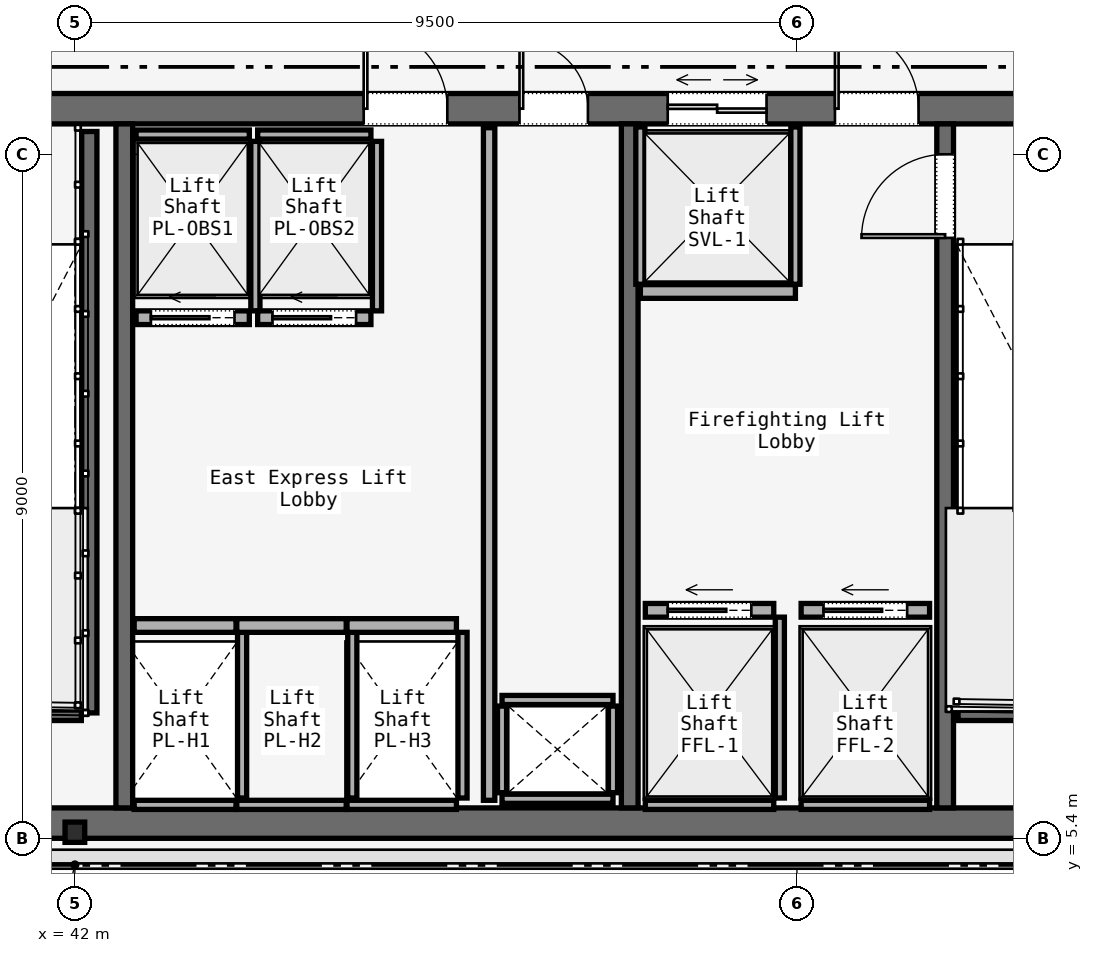
"""IFC4 building model, lengths in metres.
Left out: names, types, materials, properties, quantities, classifications, styles, units other than length and angle.
Written with IfcOpenShell. Run it as: python <this file> out.ifc"""

import sys

from ifc_helpers import new_model, si_unit, direction, frame, frame_2d, origin, origin_2d, place, context, subcontext, project, spatial, rectangle, i_section, extrude, element, fill, save


model = new_model("IFC4")
c1 = context("Model", 3, precision=1e-05, world=origin(), true_north=direction((0.0, 1.0)))
c2 = subcontext(c1, "Body", "Model", "MODEL_VIEW")
j1 = project(units=[si_unit("LENGTHUNIT", "METRE"), si_unit("PLANEANGLEUNIT", "RADIAN")], contexts=[c1])
p1 = place(None, origin())
s1 = spatial("IfcSite", under=j1, at=p1, CompositionType="ELEMENT")
p2 = place(p1, origin())
s2 = spatial("IfcBuilding", under=s1, at=p2, CompositionType="ELEMENT")
p3 = place(p2, frame((0.0, 0.0, 298.5)))
s3 = spatial("IfcBuildingStorey", under=s2, at=p3, CompositionType="ELEMENT", Elevation=298.5)
p4 = place(p3, frame((26.45, 15.0, 0.0), z_axis=(0.0, 0.0, 1.0), x_axis=(1.0, 0.0, 0.0)))
e1 = element("IfcWall", 1, at=p4, inside=s3, PredefinedType="SOLIDWALL", context=c2, shape_type="SweptSolid", body=[
    extrude(rectangle(XDim=31.1, YDim=0.4, at=frame_2d((15.55, 0.0))), origin(), (0.0, 0.0, 1.0), 4.52),
])
p5 = place(p4, frame((1.65, 0.0, 0.0)))
e2 = element("IfcOpeningElement", 2, at=p5, cuts=e1, PredefinedType="OPENING", context=c2, shape_type="SweptSolid", body=[
    extrude(rectangle(XDim=1.1, YDim=2.2, at=frame_2d((0.55, 1.1))), frame((0.0, 0.2, 0.0), z_axis=(0.0, -1.0, 0.0), x_axis=(1.0, 0.0, 0.0)), (0.0, 0.0, 1.0), 0.4),
])
p6 = place(p4, frame((13.65, 0.0, 0.0)))
e3 = element("IfcOpeningElement", 3, at=p6, cuts=e1, PredefinedType="OPENING", context=c2, shape_type="SweptSolid", body=[
    extrude(rectangle(XDim=1.1, YDim=2.2, at=frame_2d((0.55, 1.1))), frame((0.0, 0.2, 0.0), z_axis=(0.0, -1.0, 0.0), x_axis=(1.0, 0.0, 0.0)), (0.0, 0.0, 1.0), 0.4),
])
p7 = place(p4, frame((25.55, 0.0, 0.0)))
e4 = element("IfcOpeningElement", 4, at=p7, cuts=e1, PredefinedType="OPENING", context=c2, shape_type="SweptSolid", body=[
    extrude(rectangle(XDim=1.1, YDim=2.2, at=frame_2d((0.55, 1.1))), frame((0.0, 0.2, 0.0), z_axis=(0.0, -1.0, 0.0), x_axis=(1.0, 0.0, 0.0)), (0.0, 0.0, 1.0), 0.4),
])
p8 = place(p4, frame((19.35, 0.0, 0.0)))
e5 = element("IfcOpeningElement", 5, at=p8, cuts=e1, PredefinedType="OPENING", context=c2, shape_type="SweptSolid", body=[
    extrude(rectangle(XDim=1.1, YDim=2.2, at=frame_2d((0.55, 1.1))), frame((0.0, 0.2, 0.0), z_axis=(0.0, -1.0, 0.0), x_axis=(1.0, 0.0, 0.0)), (0.0, 0.0, 1.0), 0.4),
])
p9 = place(p4, frame((21.4, 0.0, 0.0)))
e6 = element("IfcOpeningElement", 6, at=p9, cuts=e1, PredefinedType="OPENING", context=c2, shape_type="SweptSolid", body=[
    extrude(rectangle(XDim=0.9, YDim=2.1, at=frame_2d((0.45, 1.05))), frame((0.0, 0.2, 0.0), z_axis=(0.0, -1.0, 0.0), x_axis=(1.0, 0.0, 0.0)), (0.0, 0.0, 1.0), 0.4),
])
p10 = place(p4, frame((6.54, 0.0, 0.0)))
e7 = element("IfcOpeningElement", 7, at=p10, cuts=e1, PredefinedType="OPENING", context=c2, shape_type="SweptSolid", body=[
    extrude(rectangle(XDim=0.95, YDim=2.2, at=frame_2d((0.475, 1.1))), frame((0.0, 0.2, 0.0), z_axis=(0.0, -1.0, 0.0), x_axis=(1.0, 0.0, 0.0)), (0.0, 0.0, 1.0), 0.4),
])
p11 = place(p4, frame((10.49, 0.0, 0.0)))
e8 = element("IfcOpeningElement", 8, at=p11, cuts=e1, PredefinedType="OPENING", context=c2, shape_type="SweptSolid", body=[
    extrude(rectangle(XDim=0.95, YDim=2.2, at=frame_2d((0.475, 1.1))), frame((0.0, 0.2, 0.0), z_axis=(0.0, -1.0, 0.0), x_axis=(1.0, 0.0, 0.0)), (0.0, 0.0, 1.0), 0.4),
])
p12 = place(p4, frame((23.35, 0.0, 0.0)))
e9 = element("IfcOpeningElement", 9, at=p12, cuts=e1, PredefinedType="OPENING", context=c2, shape_type="SweptSolid", body=[
    extrude(rectangle(XDim=1.3, YDim=2.3, at=frame_2d((0.65, 1.15))), frame((0.0, 0.2, 0.0), z_axis=(0.0, -1.0, 0.0), x_axis=(1.0, 0.0, 0.0)), (0.0, 0.0, 1.0), 0.4),
])
p13 = place(p3, frame((26.45, 5.6, 0.0), z_axis=(0.0, 0.0, 1.0), x_axis=(1.0, 0.0, 0.0)))
e10 = element("IfcWall", 10, at=p13, inside=s3, PredefinedType="SOLIDWALL", context=c2, shape_type="SweptSolid", body=[
    extrude(rectangle(XDim=31.1, YDim=0.4, at=frame_2d((15.55, 0.0))), origin(), (0.0, 0.0, 1.0), 4.52),
])
for number, where, z_axis, x_axis in (
    (11, (42.65, 5.8, 0.0), (0.0, 0.0, 1.0), (0.0, 1.0, 0.0)),
    (12, (49.3, 5.8, 0.0), (0.0, 0.0, 1.0), (0.0, 1.0, 0.0)),
):
    element("IfcWall", number, at=place(p3, frame(where, z_axis=z_axis, x_axis=x_axis)), inside=s3, PredefinedType="SOLIDWALL", context=c2, shape_type="SweptSolid", body=[
        extrude(rectangle(XDim=9.0, YDim=0.22, at=frame_2d((4.5, 0.0))), origin(), (0.0, 0.0, 1.0), 4.52),
    ])
p14 = place(p3, frame((53.45, 5.8, 0.0), z_axis=(0.0, 0.0, 1.0), x_axis=(0.0, 1.0, 0.0)))
e13 = element("IfcWall", 13, at=p14, inside=s3, PredefinedType="SOLIDWALL", context=c2, shape_type="SweptSolid", body=[
    extrude(rectangle(XDim=9.0, YDim=0.22, at=frame_2d((4.5, 0.0))), origin(), (0.0, 0.0, 1.0), 4.52),
])
p15 = place(p14, frame((7.5, 0.0, 0.0)))
e14 = element("IfcOpeningElement", 14, at=p15, cuts=e13, PredefinedType="OPENING", context=c2, shape_type="SweptSolid", body=[
    extrude(rectangle(XDim=1.1, YDim=2.2, at=frame_2d((0.55, 1.1))), frame((0.0, 0.11, 0.0), z_axis=(0.0, -1.0, 0.0), x_axis=(1.0, 0.0, 0.0)), (0.0, 0.0, 1.0), 0.22),
])
p16 = place(p3, frame((42.0, 5.48, 0.0), z_axis=(0.0, 0.0, 1.0), x_axis=(1.0, 0.0, 0.0)))
e15 = element("IfcColumn", 15, at=p16, inside=s3, PredefinedType="COLUMN", context=c2, shape_type="SweptSolid", body=[
    extrude(i_section(OverallWidth=0.259, OverallDepth=0.267, WebThickness=0.013, FlangeThickness=0.021, FilletRadius=0.013, at=origin_2d()), origin(), (0.0, 0.0, 1.0), 4.52),
])
p17 = place(p3, frame((42.19, 14.7, 0.0), z_axis=(0.0, 0.0, 1.0), x_axis=(0.0, -1.0, 0.0)))
e16 = element("IfcWall", 16, at=p17, inside=s3, PredefinedType="SOLIDWALL", context=c2, shape_type="SweptSolid", body=[
    extrude(rectangle(XDim=7.65, YDim=0.2, at=frame_2d((3.825, 0.0))), origin(), (0.0, 0.0, 1.0), 4.8),
])
for number, where, z_axis, x_axis in (
    (17, (38.97, 7.05, 0.0), (0.0, 0.0, 1.0), (1.0, 0.0, 0.0)),
    (18, (53.62, 7.05, 0.0), (0.0, 0.0, 1.0), (1.0, 0.0, 0.0)),
):
    element("IfcWall", number, at=place(p3, frame(where, z_axis=z_axis, x_axis=x_axis)), inside=s3, PredefinedType="SOLIDWALL", context=c2, shape_type="SweptSolid", body=[
        extrude(rectangle(XDim=3.115, YDim=0.2, at=frame_2d((1.558, 0.0))), origin(), (0.0, 0.0, 1.0), 4.8),
    ])
for number, where, z_axis, x_axis in (
    (19, (47.62, 5.92, 0.0), (0.0, 0.0, 1.0), (1.0, 0.0, 0.0)),
    (20, (47.62, 7.22, 0.0), (0.0, 0.0, 1.0), (1.0, 0.0, 0.0)),
):
    element("IfcWall", number, at=place(p3, frame(where, z_axis=z_axis, x_axis=x_axis)), inside=s3, PredefinedType="SOLIDWALL", context=c2, shape_type="SweptSolid", body=[
        extrude(rectangle(XDim=1.46, YDim=0.12, at=frame_2d((0.73, 0.0))), origin(), (0.0, 0.0, 1.0), 3.95),
    ])
for number, where, z_axis, x_axis in (
    (21, (47.62, 6.0, 0.0), (0.0, 0.0, 1.0), (0.0, 1.0, 0.0)),
    (22, (49.08, 6.0, 0.0), (0.0, 0.0, 1.0), (0.0, 1.0, 0.0)),
):
    element("IfcWall", number, at=place(p3, frame(where, z_axis=z_axis, x_axis=x_axis)), inside=s3, PredefinedType="SOLIDWALL", context=c2, shape_type="SweptSolid", body=[
        extrude(rectangle(XDim=1.14, YDim=0.12, at=frame_2d((0.57, 0.0))), origin(), (0.0, 0.0, 1.0), 3.95),
    ])
p18 = place(p3, frame((47.45, 5.9, 0.0), z_axis=(0.0, 0.0, 1.0), x_axis=(0.0, 1.0, 0.0)))
e23 = element("IfcWall", 23, at=p18, inside=s3, PredefinedType="PARTITIONING", context=c2, shape_type="SweptSolid", body=[
    extrude(rectangle(XDim=8.85, YDim=0.15, at=frame_2d((4.425, 0.0))), origin(), (0.0, 0.0, 1.0), 3.95),
])
p19 = place(p3, frame((42.78, 8.2, 0.0), z_axis=(0.0, 0.0, 1.0), x_axis=(1.0, 0.0, 0.0)))
e24 = element("IfcWall", 24, at=p19, inside=s3, PredefinedType="SOLIDWALL", context=c2, shape_type="SweptSolid", body=[
    extrude(rectangle(XDim=1.34, YDim=0.18, at=frame_2d((0.67, 0.0))), origin(), (0.0, 0.0, 1.0), 3.95),
])
p20 = place(p3, frame((42.78, 5.84, 0.0), z_axis=(0.0, 0.0, 1.0), x_axis=(1.0, 0.0, 0.0)))
e25 = element("IfcWall", 25, at=p20, inside=s3, PredefinedType="SOLIDWALL", context=c2, shape_type="SweptSolid", body=[
    extrude(rectangle(XDim=1.34, YDim=0.12, at=frame_2d((0.67, 0.0))), origin(), (0.0, 0.0, 1.0), 3.95),
])
p21 = place(p3, frame((44.2, 5.93, 0.0), z_axis=(0.0, 0.0, 1.0), x_axis=(0.0, 1.0, 0.0)))
e26 = element("IfcWall", 26, at=p21, inside=s3, PredefinedType="SOLIDWALL", context=c2, shape_type="SweptSolid", body=[
    extrude(rectangle(XDim=2.18, YDim=0.12, at=frame_2d((1.09, 0.0))), origin(), (0.0, 0.0, 1.0), 3.95),
])
p22 = place(p3, frame((44.13, 8.2, 0.0), z_axis=(0.0, 0.0, 1.0), x_axis=(1.0, 0.0, 0.0)))
e27 = element("IfcWall", 27, at=p22, inside=s3, PredefinedType="SOLIDWALL", context=c2, shape_type="SweptSolid", body=[
    extrude(rectangle(XDim=1.44, YDim=0.18, at=frame_2d((0.72, 0.0))), origin(), (0.0, 0.0, 1.0), 3.95),
])
p23 = place(p3, frame((44.13, 5.84, 0.0), z_axis=(0.0, 0.0, 1.0), x_axis=(1.0, 0.0, 0.0)))
e28 = element("IfcWall", 28, at=p23, inside=s3, PredefinedType="SOLIDWALL", context=c2, shape_type="SweptSolid", body=[
    extrude(rectangle(XDim=1.44, YDim=0.12, at=frame_2d((0.72, 0.0))), origin(), (0.0, 0.0, 1.0), 3.95),
])
p24 = place(p3, frame((45.65, 5.93, 0.0), z_axis=(0.0, 0.0, 1.0), x_axis=(0.0, 1.0, 0.0)))
e29 = element("IfcWall", 29, at=p24, inside=s3, PredefinedType="SOLIDWALL", context=c2, shape_type="SweptSolid", body=[
    extrude(rectangle(XDim=2.18, YDim=0.12, at=frame_2d((1.09, 0.0))), origin(), (0.0, 0.0, 1.0), 3.95),
])
p25 = place(p3, frame((45.58, 8.2, 0.0), z_axis=(0.0, 0.0, 1.0), x_axis=(1.0, 0.0, 0.0)))
e30 = element("IfcWall", 30, at=p25, inside=s3, PredefinedType="SOLIDWALL", context=c2, shape_type="SweptSolid", body=[
    extrude(rectangle(XDim=1.44, YDim=0.18, at=frame_2d((0.72, 0.0))), origin(), (0.0, 0.0, 1.0), 3.95),
])
p26 = place(p3, frame((45.58, 5.84, 0.0), z_axis=(0.0, 0.0, 1.0), x_axis=(1.0, 0.0, 0.0)))
e31 = element("IfcWall", 31, at=p26, inside=s3, PredefinedType="SOLIDWALL", context=c2, shape_type="SweptSolid", body=[
    extrude(rectangle(XDim=1.44, YDim=0.12, at=frame_2d((0.72, 0.0))), origin(), (0.0, 0.0, 1.0), 3.95),
])
p27 = place(p3, frame((47.1, 5.93, 0.0), z_axis=(0.0, 0.0, 1.0), x_axis=(0.0, 1.0, 0.0)))
e32 = element("IfcWall", 32, at=p27, inside=s3, PredefinedType="SOLIDWALL", context=c2, shape_type="SweptSolid", body=[
    extrude(rectangle(XDim=2.18, YDim=0.12, at=frame_2d((1.09, 0.0))), origin(), (0.0, 0.0, 1.0), 3.95),
])
p28 = place(p3, frame((42.805, 12.25, 0.0), z_axis=(0.0, 0.0, 1.0), x_axis=(1.0, 0.0, 0.0)))
e33 = element("IfcWall", 33, at=p28, inside=s3, PredefinedType="SOLIDWALL", context=c2, shape_type="SweptSolid", body=[
    extrude(rectangle(XDim=1.49, YDim=0.18, at=frame_2d((0.745, 0.0))), origin(), (0.0, 0.0, 1.0), 3.95),
])
p29 = place(p28, frame((0.195, 0.0, 0.0)))
e34 = element("IfcOpeningElement", 34, at=p29, cuts=e33, PredefinedType="OPENING", context=c2, shape_type="SweptSolid", body=[
    extrude(rectangle(XDim=1.1, YDim=2.2, at=frame_2d((0.55, 1.1))), frame((0.0, 0.09, 0.0), z_axis=(0.0, -1.0, 0.0), x_axis=(1.0, 0.0, 0.0)), (0.0, 0.0, 1.0), 0.18),
])
p30 = place(p3, frame((42.805, 14.66, 0.0), z_axis=(0.0, 0.0, 1.0), x_axis=(1.0, 0.0, 0.0)))
e35 = element("IfcWall", 35, at=p30, inside=s3, PredefinedType="SOLIDWALL", context=c2, shape_type="SweptSolid", body=[
    extrude(rectangle(XDim=1.49, YDim=0.12, at=frame_2d((0.745, 0.0))), origin(), (0.0, 0.0, 1.0), 3.95),
])
p31 = place(p3, frame((44.375, 12.34, 0.0), z_axis=(0.0, 0.0, 1.0), x_axis=(0.0, 1.0, 0.0)))
e36 = element("IfcWall", 36, at=p31, inside=s3, PredefinedType="SOLIDWALL", context=c2, shape_type="SweptSolid", body=[
    extrude(rectangle(XDim=2.23, YDim=0.12, at=frame_2d((1.115, 0.0))), origin(), (0.0, 0.0, 1.0), 3.95),
])
p32 = place(p3, frame((44.405, 12.25, 0.0), z_axis=(0.0, 0.0, 1.0), x_axis=(1.0, 0.0, 0.0)))
e37 = element("IfcWall", 37, at=p32, inside=s3, PredefinedType="SOLIDWALL", context=c2, shape_type="SweptSolid", body=[
    extrude(rectangle(XDim=1.49, YDim=0.18, at=frame_2d((0.745, 0.0))), origin(), (0.0, 0.0, 1.0), 3.95),
])
p33 = place(p32, frame((0.195, 0.0, 0.0)))
e38 = element("IfcOpeningElement", 38, at=p33, cuts=e37, PredefinedType="OPENING", context=c2, shape_type="SweptSolid", body=[
    extrude(rectangle(XDim=1.1, YDim=2.2, at=frame_2d((0.55, 1.1))), frame((0.0, 0.09, 0.0), z_axis=(0.0, -1.0, 0.0), x_axis=(1.0, 0.0, 0.0)), (0.0, 0.0, 1.0), 0.18),
])
p34 = place(p3, frame((44.405, 14.66, 0.0), z_axis=(0.0, 0.0, 1.0), x_axis=(1.0, 0.0, 0.0)))
e39 = element("IfcWall", 39, at=p34, inside=s3, PredefinedType="SOLIDWALL", context=c2, shape_type="SweptSolid", body=[
    extrude(rectangle(XDim=1.49, YDim=0.12, at=frame_2d((0.745, 0.0))), origin(), (0.0, 0.0, 1.0), 3.95),
])
p35 = place(p3, frame((45.975, 12.34, 0.0), z_axis=(0.0, 0.0, 1.0), x_axis=(0.0, 1.0, 0.0)))
e40 = element("IfcWall", 40, at=p35, inside=s3, PredefinedType="SOLIDWALL", context=c2, shape_type="SweptSolid", body=[
    extrude(rectangle(XDim=2.23, YDim=0.12, at=frame_2d((1.115, 0.0))), origin(), (0.0, 0.0, 1.0), 3.95),
])
p36 = place(p3, frame((49.505, 8.4, 0.0), z_axis=(0.0, 0.0, 1.0), x_axis=(1.0, 0.0, 0.0)))
e41 = element("IfcWall", 41, at=p36, inside=s3, PredefinedType="SOLIDWALL", context=c2, shape_type="SweptSolid", body=[
    extrude(rectangle(XDim=1.69, YDim=0.18, at=frame_2d((0.845, 0.0))), origin(), (0.0, 0.0, 1.0), 3.95),
])
p37 = place(p36, frame((0.295, 0.0, 0.0)))
e42 = element("IfcOpeningElement", 42, at=p37, cuts=e41, PredefinedType="OPENING", context=c2, shape_type="SweptSolid", body=[
    extrude(rectangle(XDim=1.1, YDim=2.2, at=frame_2d((0.55, 1.1))), frame((0.0, 0.09, 0.0), z_axis=(0.0, -1.0, 0.0), x_axis=(1.0, 0.0, 0.0)), (0.0, 0.0, 1.0), 0.18),
])
p38 = place(p3, frame((49.505, 5.84, 0.0), z_axis=(0.0, 0.0, 1.0), x_axis=(1.0, 0.0, 0.0)))
e43 = element("IfcWall", 43, at=p38, inside=s3, PredefinedType="SOLIDWALL", context=c2, shape_type="SweptSolid", body=[
    extrude(rectangle(XDim=1.69, YDim=0.12, at=frame_2d((0.845, 0.0))), origin(), (0.0, 0.0, 1.0), 3.95),
])
p39 = place(p3, frame((51.275, 5.93, 0.0), z_axis=(0.0, 0.0, 1.0), x_axis=(0.0, 1.0, 0.0)))
e44 = element("IfcWall", 44, at=p39, inside=s3, PredefinedType="SOLIDWALL", context=c2, shape_type="SweptSolid", body=[
    extrude(rectangle(XDim=2.38, YDim=0.12, at=frame_2d((1.19, 0.0))), origin(), (0.0, 0.0, 1.0), 3.95),
])
p40 = place(p3, frame((51.555, 8.4, 0.0), z_axis=(0.0, 0.0, 1.0), x_axis=(1.0, 0.0, 0.0)))
e45 = element("IfcWall", 45, at=p40, inside=s3, PredefinedType="SOLIDWALL", context=c2, shape_type="SweptSolid", body=[
    extrude(rectangle(XDim=1.69, YDim=0.18, at=frame_2d((0.845, 0.0))), origin(), (0.0, 0.0, 1.0), 3.95),
])
p41 = place(p40, frame((0.295, 0.0, 0.0)))
e46 = element("IfcOpeningElement", 46, at=p41, cuts=e45, PredefinedType="OPENING", context=c2, shape_type="SweptSolid", body=[
    extrude(rectangle(XDim=1.1, YDim=2.2, at=frame_2d((0.55, 1.1))), frame((0.0, 0.09, 0.0), z_axis=(0.0, -1.0, 0.0), x_axis=(1.0, 0.0, 0.0)), (0.0, 0.0, 1.0), 0.18),
])
p42 = place(p3, frame((51.555, 5.84, 0.0), z_axis=(0.0, 0.0, 1.0), x_axis=(1.0, 0.0, 0.0)))
e47 = element("IfcWall", 47, at=p42, inside=s3, PredefinedType="SOLIDWALL", context=c2, shape_type="SweptSolid", body=[
    extrude(rectangle(XDim=1.69, YDim=0.12, at=frame_2d((0.845, 0.0))), origin(), (0.0, 0.0, 1.0), 3.95),
])
p43 = place(p3, frame((49.44, 12.595, 0.0), z_axis=(0.0, 0.0, 1.0), x_axis=(1.0, 0.0, 0.0)))
e48 = element("IfcWall", 48, at=p43, inside=s3, PredefinedType="SOLIDWALL", context=c2, shape_type="SweptSolid", body=[
    extrude(rectangle(XDim=2.04, YDim=0.18, at=frame_2d((1.02, 0.0))), origin(), (0.0, 0.0, 1.0), 3.95),
])
for number, where, z_axis, x_axis in (
    (49, (49.44, 12.69, 0.0), (0.0, 0.0, 1.0), (0.0, 1.0, 0.0)),
    (50, (51.48, 12.69, 0.0), (0.0, 0.0, 1.0), (0.0, 1.0, 0.0)),
):
    element("IfcWall", number, at=place(p3, frame(where, z_axis=z_axis, x_axis=x_axis)), inside=s3, PredefinedType="SOLIDWALL", context=c2, shape_type="SweptSolid", body=[
        extrude(rectangle(XDim=2.07, YDim=0.12, at=frame_2d((1.035, 0.0))), origin(), (0.0, 0.0, 1.0), 3.95),
    ])
p44 = place(p7, origin())
e51 = element("IfcDoor", 51, at=p44, inside=s3, OperationType="SINGLE_SWING_RIGHT", PredefinedType="DOOR", context=c2, shape_type="SweptSolid", body=[
    extrude(rectangle(XDim=1.1, YDim=2.2, at=frame_2d((0.55, 1.1))), frame((0.0, 0.025, 0.0), z_axis=(0.0, -1.0, 0.0), x_axis=(1.0, 0.0, 0.0)), (0.0, 0.0, 1.0), 0.05),
])
fill(e4, e51)
p45 = place(p8, origin())
e52 = element("IfcDoor", 52, at=p45, inside=s3, OperationType="SINGLE_SWING_LEFT", PredefinedType="DOOR", context=c2, shape_type="SweptSolid", body=[
    extrude(rectangle(XDim=1.1, YDim=2.2, at=frame_2d((0.55, 1.1))), frame((0.0, 0.025, 0.0), z_axis=(0.0, -1.0, 0.0), x_axis=(1.0, 0.0, 0.0)), (0.0, 0.0, 1.0), 0.05),
])
fill(e5, e52)
p46 = place(p9, origin())
e53 = element("IfcDoor", 53, at=p46, inside=s3, OperationType="SINGLE_SWING_LEFT", PredefinedType="DOOR", context=c2, shape_type="SweptSolid", body=[
    extrude(rectangle(XDim=0.9, YDim=2.1, at=frame_2d((0.45, 1.05))), frame((0.0, 0.025, 0.0), z_axis=(0.0, -1.0, 0.0), x_axis=(1.0, 0.0, 0.0)), (0.0, 0.0, 1.0), 0.05),
])
fill(e6, e53)
p47 = place(p15, origin())
e54 = element("IfcDoor", 54, at=p47, inside=s3, OperationType="SINGLE_SWING_LEFT", PredefinedType="DOOR", context=c2, shape_type="SweptSolid", body=[
    extrude(rectangle(XDim=1.1, YDim=2.2, at=frame_2d((0.55, 1.1))), frame((0.0, 0.025, 0.0), z_axis=(0.0, -1.0, 0.0), x_axis=(1.0, 0.0, 0.0)), (0.0, 0.0, 1.0), 0.05),
])
fill(e14, e54)
p48 = place(p29, origin())
e55 = element("IfcDoor", 55, at=p48, inside=s3, OperationType="SLIDING_TO_LEFT", PredefinedType="DOOR", context=c2, shape_type="SweptSolid", body=[
    extrude(rectangle(XDim=1.1, YDim=2.2, at=frame_2d((0.55, 1.1))), frame((0.0, 0.025, 0.0), z_axis=(0.0, -1.0, 0.0), x_axis=(1.0, 0.0, 0.0)), (0.0, 0.0, 1.0), 0.05),
])
fill(e34, e55)
p49 = place(p33, origin())
e56 = element("IfcDoor", 56, at=p49, inside=s3, OperationType="SLIDING_TO_LEFT", PredefinedType="DOOR", context=c2, shape_type="SweptSolid", body=[
    extrude(rectangle(XDim=1.1, YDim=2.2, at=frame_2d((0.55, 1.1))), frame((0.0, 0.025, 0.0), z_axis=(0.0, -1.0, 0.0), x_axis=(1.0, 0.0, 0.0)), (0.0, 0.0, 1.0), 0.05),
])
fill(e38, e56)
p50 = place(p37, origin())
e57 = element("IfcDoor", 57, at=p50, inside=s3, OperationType="SLIDING_TO_LEFT", PredefinedType="DOOR", context=c2, shape_type="SweptSolid", body=[
    extrude(rectangle(XDim=1.1, YDim=2.2, at=frame_2d((0.55, 1.1))), frame((0.0, 0.025, 0.0), z_axis=(0.0, -1.0, 0.0), x_axis=(1.0, 0.0, 0.0)), (0.0, 0.0, 1.0), 0.05),
])
fill(e42, e57)
p51 = place(p41, origin())
e58 = element("IfcDoor", 58, at=p51, inside=s3, OperationType="SLIDING_TO_LEFT", PredefinedType="DOOR", context=c2, shape_type="SweptSolid", body=[
    extrude(rectangle(XDim=1.1, YDim=2.2, at=frame_2d((0.55, 1.1))), frame((0.0, 0.025, 0.0), z_axis=(0.0, -1.0, 0.0), x_axis=(1.0, 0.0, 0.0)), (0.0, 0.0, 1.0), 0.05),
])
fill(e46, e58)
p52 = place(p12, origin())
e59 = element("IfcDoor", 59, at=p52, inside=s3, OperationType="DOUBLE_DOOR_SLIDING", PredefinedType="DOOR", context=c2, shape_type="SweptSolid", body=[
    extrude(rectangle(XDim=1.3, YDim=2.3, at=frame_2d((0.65, 1.15))), frame((0.0, 0.025, 0.0), z_axis=(0.0, -1.0, 0.0), x_axis=(1.0, 0.0, 0.0)), (0.0, 0.0, 1.0), 0.05),
])
fill(e9, e59)
save(model, sys.argv[1])
